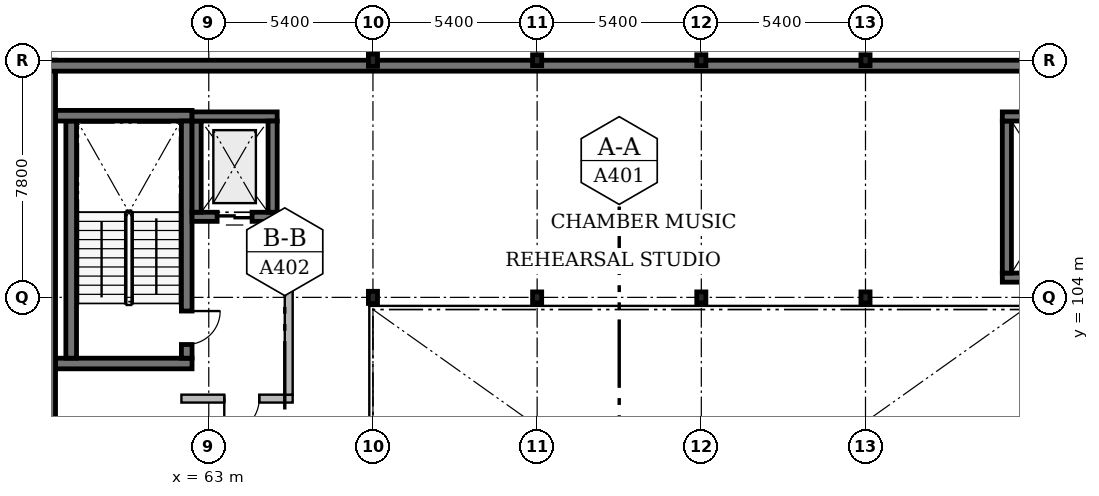
"""IFC4 building model, lengths in metres.
Left out: names, types, materials, properties, quantities, classifications, styles, units other than length and angle.
Written with IfcOpenShell. Run it as: python <this file> out.ifc"""

import sys

from ifc_helpers import new_model, si_unit, direction, frame, frame_2d, origin, origin_2d, place, context, subcontext, project, spatial, rectangle, i_section, extrude, element, fill, save


model = new_model("IFC4")
c1 = context("Model", 3, precision=1e-05, world=origin(), true_north=direction((0.0, 1.0)))
c2 = subcontext(c1, "Body", "Model", "MODEL_VIEW")
j1 = project(units=[si_unit("LENGTHUNIT", "METRE"), si_unit("PLANEANGLEUNIT", "RADIAN")], contexts=[c1])
p1 = place(None, origin())
s1 = spatial("IfcSite", under=j1, at=p1, CompositionType="ELEMENT")
p2 = place(p1, origin())
s2 = spatial("IfcBuilding", under=s1, at=p2, CompositionType="ELEMENT")
p3 = place(p2, frame((0.0, 0.0, 17.1)))
s3 = spatial("IfcBuildingStorey", under=s2, at=p3, CompositionType="ELEMENT", Elevation=17.1)
for number, where, z_axis, x_axis in (
    (1, (68.4, 104.0, 0.0), (0.0, 0.0, 1.0), (1.0, 0.0, 0.0)),
    (2, (68.4, 111.8, 0.0), (0.0, 0.0, 1.0), (1.0, 0.0, 0.0)),
):
    element("IfcColumn", number, at=place(p3, frame(where, z_axis=z_axis, x_axis=x_axis)), inside=s3, PredefinedType="COLUMN", context=c2, shape_type="SweptSolid", body=[
        extrude(i_section(OverallWidth=0.3, OverallDepth=0.4, WebThickness=0.013, FlangeThickness=0.024, FilletRadius=0.027, at=origin_2d()), origin(), (0.0, 0.0, 1.0), 3.9),
    ])
for number, where, z_axis, x_axis in (
    (3, (73.8, 104.0, 0.0), (0.0, 0.0, 1.0), (1.0, 0.0, 0.0)),
    (4, (73.8, 111.8, 0.0), (0.0, 0.0, 1.0), (1.0, 0.0, 0.0)),
    (5, (79.2, 104.0, 0.0), (0.0, 0.0, 1.0), (1.0, 0.0, 0.0)),
    (6, (79.2, 111.8, 0.0), (0.0, 0.0, 1.0), (1.0, 0.0, 0.0)),
    (7, (84.6, 104.0, 0.0), (0.0, 0.0, 1.0), (1.0, 0.0, 0.0)),
    (8, (84.6, 111.8, 0.0), (0.0, 0.0, 1.0), (1.0, 0.0, 0.0)),
):
    element("IfcColumn", number, at=place(p3, frame(where, z_axis=z_axis, x_axis=x_axis)), inside=s3, PredefinedType="COLUMN", context=c2, shape_type="SweptSolid", body=[
        extrude(i_section(OverallWidth=0.3, OverallDepth=0.36, WebThickness=0.012, FlangeThickness=0.022, FilletRadius=0.027, at=origin_2d()), origin(), (0.0, 0.0, 1.0), 3.9),
    ])
p4 = place(p3, frame((62.45, 101.825, 0.0), z_axis=(0.0, 0.0, 1.0), x_axis=(-1.0, 0.0, 0.0)))
e9 = element("IfcWall", 9, at=p4, inside=s3, PredefinedType="SOLIDWALL", context=c2, shape_type="SweptSolid", body=[
    extrude(rectangle(XDim=4.49, YDim=0.35, at=frame_2d((2.245, 0.0))), origin(), (0.0, 0.0, 1.0), 3.9),
])
p5 = place(p3, frame((58.475, 102.0, 0.0), z_axis=(0.0, 0.0, 1.0), x_axis=(0.0, 1.0, 0.0)))
e10 = element("IfcWall", 10, at=p5, inside=s3, PredefinedType="SOLIDWALL", context=c2, shape_type="SweptSolid", body=[
    extrude(rectangle(XDim=7.8, YDim=0.35, at=frame_2d((3.9, 0.0))), origin(), (0.0, 0.0, 1.0), 3.9),
])
p6 = place(p3, frame((57.96, 109.975, 0.0), z_axis=(0.0, 0.0, 1.0), x_axis=(1.0, 0.0, 0.0)))
e11 = element("IfcWall", 11, at=p6, inside=s3, PredefinedType="SOLIDWALL", context=c2, shape_type="SweptSolid", body=[
    extrude(rectangle(XDim=4.49, YDim=0.35, at=frame_2d((2.245, 0.0))), origin(), (0.0, 0.0, 1.0), 3.9),
])
p7 = place(p3, frame((62.275, 109.8, 0.0), z_axis=(0.0, 0.0, 1.0), x_axis=(0.0, -1.0, 0.0)))
e12 = element("IfcWall", 12, at=p7, inside=s3, PredefinedType="SOLIDWALL", context=c2, shape_type="SweptSolid", body=[
    extrude(rectangle(XDim=7.8, YDim=0.35, at=frame_2d((3.9, 0.0))), origin(), (0.0, 0.0, 1.0), 3.9),
])
p8 = place(p7, frame((6.25, 0.0, 0.0)))
e13 = element("IfcOpeningElement", 13, at=p8, cuts=e12, PredefinedType="OPENING", context=c2, shape_type="SweptSolid", body=[
    extrude(rectangle(XDim=1.1, YDim=2.15, at=frame_2d((0.55, 1.075))), frame((0.0, 0.195, 0.0), z_axis=(0.0, -1.0, 0.0), x_axis=(1.0, 0.0, 0.0)), (0.0, 0.0, 1.0), 0.39),
])
p9 = place(p3, frame((65.25, 106.65, 0.0), z_axis=(0.0, 0.0, 1.0), x_axis=(-1.0, 0.0, 0.0)))
e14 = element("IfcWall", 14, at=p9, inside=s3, PredefinedType="SOLIDWALL", context=c2, shape_type="SweptSolid", body=[
    extrude(rectangle(XDim=2.8, YDim=0.3, at=frame_2d((1.4, 0.0))), origin(), (0.0, 0.0, 1.0), 3.9),
])
p10 = place(p9, frame((0.825, 0.0, 0.0)))
e15 = element("IfcOpeningElement", 15, at=p10, cuts=e14, PredefinedType="OPENING", context=c2, shape_type="SweptSolid", body=[
    extrude(rectangle(XDim=1.15, YDim=2.1, at=frame_2d((0.575, 1.05))), frame((0.0, 0.17, 0.0), z_axis=(0.0, -1.0, 0.0), x_axis=(1.0, 0.0, 0.0)), (0.0, 0.0, 1.0), 0.34),
])
p11 = place(p3, frame((62.6, 106.8, 0.0), z_axis=(0.0, 0.0, 1.0), x_axis=(0.0, 1.0, 0.0)))
e16 = element("IfcWall", 16, at=p11, inside=s3, PredefinedType="SOLIDWALL", context=c2, shape_type="SweptSolid", body=[
    extrude(rectangle(XDim=3.0, YDim=0.3, at=frame_2d((1.5, 0.0))), origin(), (0.0, 0.0, 1.0), 3.9),
])
p12 = place(p3, frame((62.45, 109.95, 0.0), z_axis=(0.0, 0.0, 1.0), x_axis=(1.0, 0.0, 0.0)))
e17 = element("IfcWall", 17, at=p12, inside=s3, PredefinedType="SOLIDWALL", context=c2, shape_type="SweptSolid", body=[
    extrude(rectangle(XDim=2.8, YDim=0.3, at=frame_2d((1.4, 0.0))), origin(), (0.0, 0.0, 1.0), 3.9),
])
p13 = place(p3, frame((65.1, 109.8, 0.0), z_axis=(0.0, 0.0, 1.0), x_axis=(0.0, -1.0, 0.0)))
e18 = element("IfcWall", 18, at=p13, inside=s3, PredefinedType="SOLIDWALL", context=c2, shape_type="SweptSolid", body=[
    extrude(rectangle(XDim=3.0, YDim=0.3, at=frame_2d((1.5, 0.0))), origin(), (0.0, 0.0, 1.0), 3.9),
])
p14 = place(p3, frame((65.76, 100.67, 0.0), z_axis=(0.0, 0.0, 1.0), x_axis=(-1.0, 0.0, 0.0)))
e19 = element("IfcWall", 19, at=p14, inside=s3, PredefinedType="SOLIDWALL", context=c2, shape_type="SweptSolid", body=[
    extrude(rectangle(XDim=3.66, YDim=0.26, at=frame_2d((1.83, 0.0))), origin(), (0.0, 0.0, 1.0), 3.68),
])
p15 = place(p14, frame((1.1, 0.0, 0.0)))
e20 = element("IfcOpeningElement", 20, at=p15, cuts=e19, PredefinedType="OPENING", context=c2, shape_type="SweptSolid", body=[
    extrude(rectangle(XDim=1.15, YDim=2.2, at=frame_2d((0.575, 1.1))), frame((0.0, 0.15, 0.0), z_axis=(0.0, -1.0, 0.0), x_axis=(1.0, 0.0, 0.0)), (0.0, 0.0, 1.0), 0.3),
])
p16 = place(p3, frame((65.63, 106.65, 0.0), z_axis=(0.0, 0.0, 1.0), x_axis=(0.0, -1.0, 0.0)))
e21 = element("IfcWall", 21, at=p16, inside=s3, PredefinedType="SOLIDWALL", context=c2, shape_type="SweptSolid", body=[
    extrude(rectangle(XDim=5.85, YDim=0.26, at=frame_2d((2.925, 0.0))), origin(), (0.0, 0.0, 1.0), 3.68),
])
p17 = place(p3, frame((92.9, 104.65, 0.0), z_axis=(0.0, 0.0, 1.0), x_axis=(-1.0, 0.0, 0.0)))
e22 = element("IfcWall", 22, at=p17, inside=s3, PredefinedType="SOLIDWALL", context=c2, shape_type="SweptSolid", body=[
    extrude(rectangle(XDim=3.8, YDim=0.3, at=frame_2d((1.9, 0.0))), origin(), (0.0, 0.0, 1.0), 3.9),
])
p18 = place(p17, frame((1.0, 0.0, 0.0)))
e23 = element("IfcOpeningElement", 23, at=p18, cuts=e22, PredefinedType="OPENING", context=c2, shape_type="SweptSolid", body=[
    extrude(rectangle(XDim=1.8, YDim=2.4, at=frame_2d((0.9, 1.2))), frame((0.0, 0.17, 0.0), z_axis=(0.0, -1.0, 0.0), x_axis=(1.0, 0.0, 0.0)), (0.0, 0.0, 1.0), 0.34),
])
p19 = place(p3, frame((89.25, 104.8, 0.0), z_axis=(0.0, 0.0, 1.0), x_axis=(0.0, 1.0, 0.0)))
e24 = element("IfcWall", 24, at=p19, inside=s3, PredefinedType="SOLIDWALL", context=c2, shape_type="SweptSolid", body=[
    extrude(rectangle(XDim=5.0, YDim=0.3, at=frame_2d((2.5, 0.0))), origin(), (0.0, 0.0, 1.0), 3.9),
])
p20 = place(p3, frame((89.1, 109.95, 0.0), z_axis=(0.0, 0.0, 1.0), x_axis=(1.0, 0.0, 0.0)))
e25 = element("IfcWall", 25, at=p20, inside=s3, PredefinedType="SOLIDWALL", context=c2, shape_type="SweptSolid", body=[
    extrude(rectangle(XDim=3.8, YDim=0.3, at=frame_2d((1.9, 0.0))), origin(), (0.0, 0.0, 1.0), 3.9),
])
p21 = place(p3, frame((57.78, 87.8, 0.0), z_axis=(0.0, 0.0, 1.0), x_axis=(0.0, 1.0, 0.0)))
e26 = element("IfcWall", 26, at=p21, inside=s3, PredefinedType="SOLIDWALL", context=c2, shape_type="SweptSolid", body=[
    extrude(rectangle(XDim=24.0, YDim=0.36, at=frame_2d((12.0, 0.0))), origin(), (0.0, 0.0, 1.0), 3.65),
])
p22 = place(p3, frame((57.6, 111.62, 0.0), z_axis=(0.0, 0.0, 1.0), x_axis=(1.0, 0.0, 0.0)))
e27 = element("IfcWall", 27, at=p22, inside=s3, PredefinedType="SOLIDWALL", context=c2, shape_type="SweptSolid", body=[
    extrude(rectangle(XDim=45.0, YDim=0.36, at=frame_2d((22.5, 0.0))), origin(), (0.0, 0.0, 1.0), 3.65),
])
p23 = place(p8, origin())
e28 = element("IfcDoor", 28, at=p23, inside=s3, OperationType="SINGLE_SWING_LEFT", PredefinedType="DOOR", context=c2, shape_type="SweptSolid", body=[
    extrude(rectangle(XDim=1.1, YDim=2.15, at=frame_2d((0.55, 1.075))), frame((0.0, 0.025, 0.0), z_axis=(0.0, -1.0, 0.0), x_axis=(1.0, 0.0, 0.0)), (0.0, 0.0, 1.0), 0.05),
])
fill(e13, e28)
p24 = place(p10, origin())
e29 = element("IfcDoor", 29, at=p24, inside=s3, OperationType="DOUBLE_DOOR_SLIDING", PredefinedType="DOOR", context=c2, shape_type="SweptSolid", body=[
    extrude(rectangle(XDim=1.15, YDim=2.1, at=frame_2d((0.575, 1.05))), frame((0.0, 0.025, 0.0), z_axis=(0.0, -1.0, 0.0), x_axis=(1.0, 0.0, 0.0)), (0.0, 0.0, 1.0), 0.05),
])
fill(e15, e29)
p25 = place(p15, origin())
e30 = element("IfcDoor", 30, at=p25, inside=s3, OperationType="SINGLE_SWING_RIGHT", PredefinedType="DOOR", context=c2, shape_type="SweptSolid", body=[
    extrude(rectangle(XDim=1.15, YDim=2.2, at=frame_2d((0.575, 1.1))), frame((0.0, 0.025, 0.0), z_axis=(0.0, -1.0, 0.0), x_axis=(1.0, 0.0, 0.0)), (0.0, 0.0, 1.0), 0.05),
])
fill(e20, e30)
save(model, sys.argv[1])
